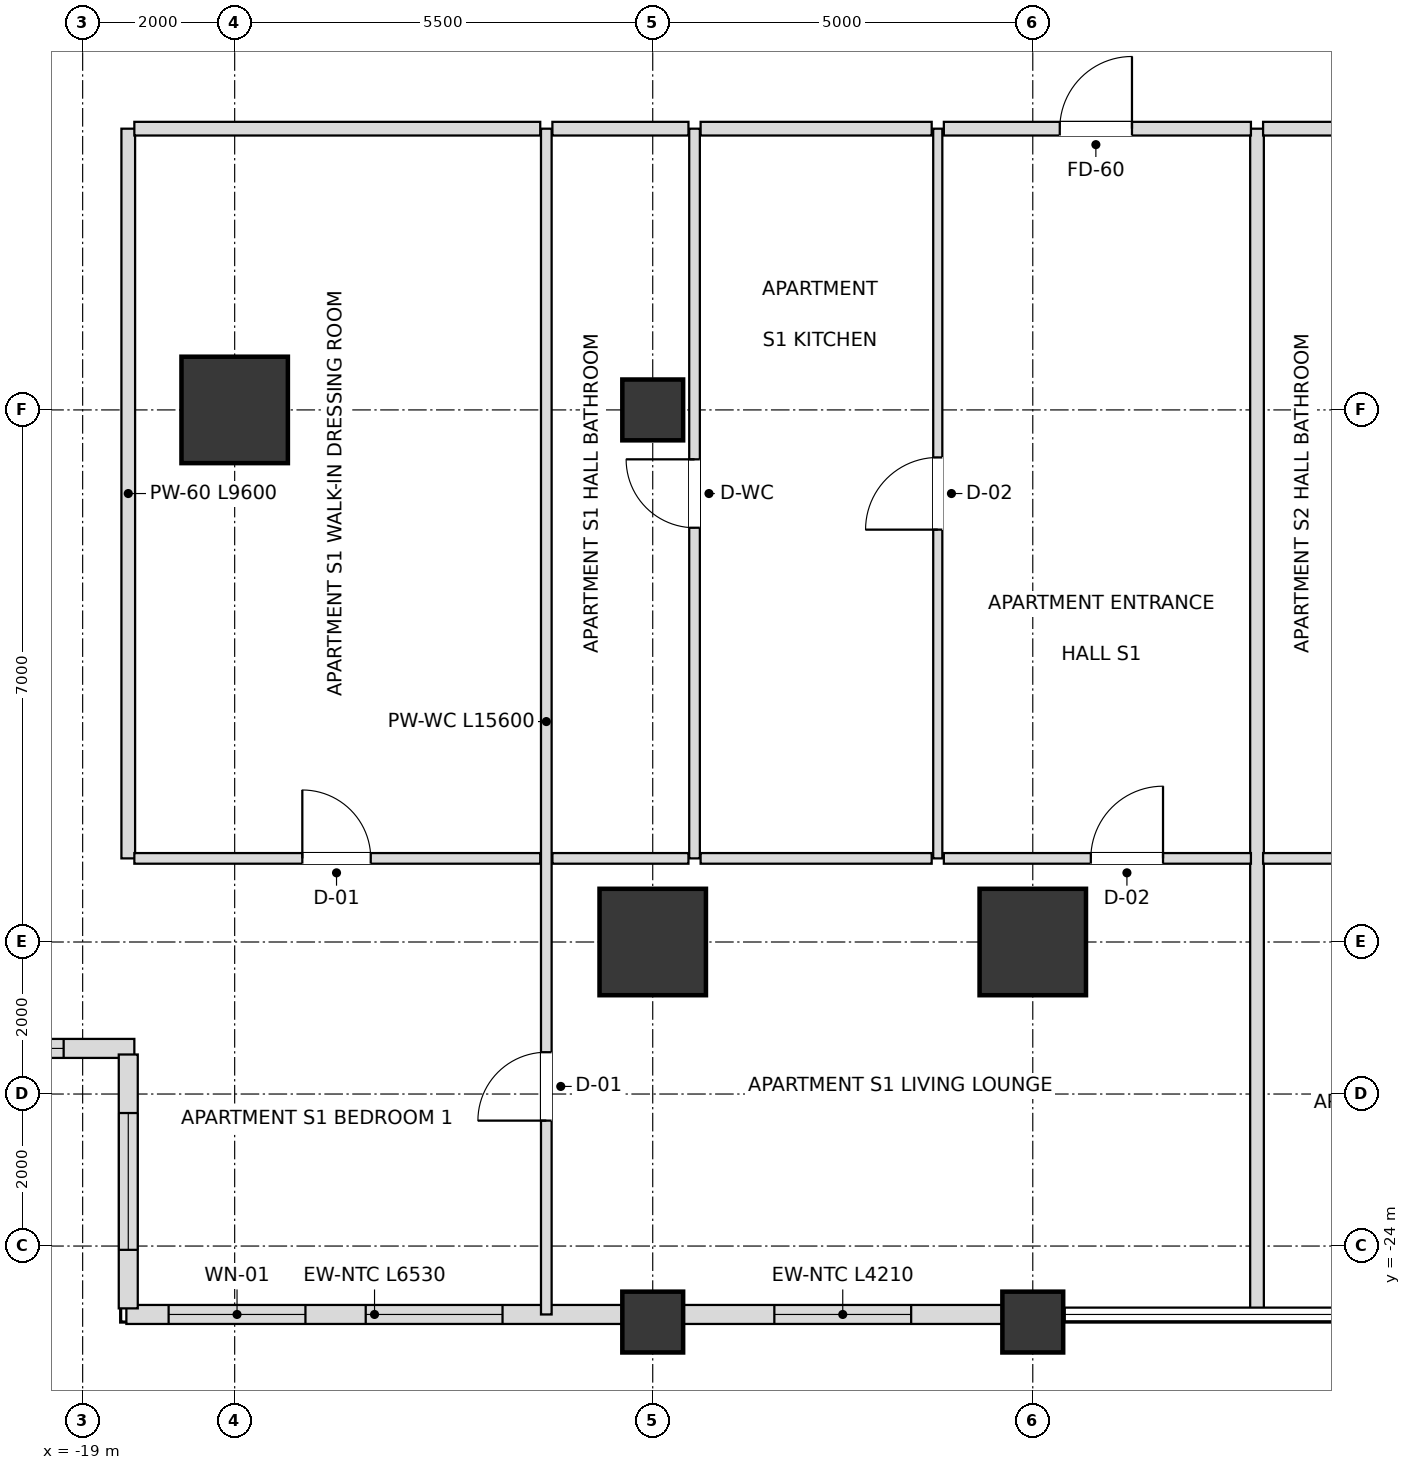
"""IFC4 building model, lengths in metres.
Left out: names, types, materials, properties, quantities, classifications, styles, units other than length and angle.
Written with IfcOpenShell. Run it as: python <this file> out.ifc"""

import sys

from ifc_helpers import new_model, si_unit, direction, frame, frame_2d, origin, origin_2d, place, context, subcontext, project, spatial, rectangle, extrude, element, fill, save


model = new_model("IFC4")
c1 = context("Model", 3, precision=1e-05, world=origin(), true_north=direction((0.0, 1.0)))
c2 = subcontext(c1, "Body", "Model", "MODEL_VIEW")
j1 = project(units=[si_unit("LENGTHUNIT", "METRE"), si_unit("PLANEANGLEUNIT", "RADIAN")], contexts=[c1])
p1 = place(None, origin())
s1 = spatial("IfcSite", under=j1, at=p1, CompositionType="ELEMENT")
p2 = place(p1, origin())
s2 = spatial("IfcBuilding", under=s1, at=p2, CompositionType="ELEMENT")
p3 = place(p2, frame((0.0, 0.0, 46.8)))
s3 = spatial("IfcBuildingStorey", under=s2, at=p3, CompositionType="ELEMENT", Elevation=46.8)
for number, where, z_axis, x_axis in (
    (1, (-11.5, -20.0, 0.0), (0.0, 0.0, 1.0), (1.0, 0.0, 0.0)),
    (2, (-6.5, -20.0, 0.0), (0.0, 0.0, 1.0), (1.0, 0.0, 0.0)),
    (3, (-17.0, -13.0, 0.0), (0.0, 0.0, 1.0), (1.0, 0.0, 0.0)),
):
    element("IfcColumn", number, at=place(p3, frame(where, z_axis=z_axis, x_axis=x_axis)), inside=s3, PredefinedType="USERDEFINED", context=c2, shape_type="SweptSolid", body=[
        extrude(rectangle(XDim=1.4, YDim=1.4, at=origin_2d()), origin(), (0.0, 0.0, 1.0), 3.6),
    ])
for number, where, z_axis, x_axis in (
    (4, (-11.5, -13.0, 0.0), (0.0, 0.0, 1.0), (1.0, 0.0, 0.0)),
    (5, (-11.5, -25.0, 0.0), (0.0, 0.0, 1.0), (1.0, 0.0, 0.0)),
    (6, (-6.5, -25.0, 0.0), (0.0, 0.0, 1.0), (1.0, 0.0, 0.0)),
):
    element("IfcColumn", number, at=place(p3, frame(where, z_axis=z_axis, x_axis=x_axis)), inside=s3, PredefinedType="COLUMN", context=c2, shape_type="SweptSolid", body=[
        extrude(rectangle(XDim=0.8, YDim=0.8, at=origin_2d()), origin(), (0.0, 0.0, 1.0), 3.6),
    ])
p4 = place(p3, frame((-18.425, -24.9, 0.0), z_axis=(0.0, 0.0, 1.0), x_axis=(1.0, 0.0, 0.0)))
e7 = element("IfcWall", 7, at=p4, inside=s3, PredefinedType="SOLIDWALL", context=c2, shape_type="SweptSolid", body=[
    extrude(rectangle(XDim=6.53, YDim=0.25, at=frame_2d((3.265, 0.0))), origin(), (0.0, 0.0, 1.0), 2.736),
])
p5 = place(p4, frame((0.556, 0.0, 0.72)))
e8 = element("IfcOpeningElement", 8, at=p5, cuts=e7, PredefinedType="OPENING", context=c2, shape_type="SweptSolid", body=[
    extrude(rectangle(XDim=1.8, YDim=1.68, at=frame_2d((0.9, 0.84))), frame((0.0, 0.135, 0.0), z_axis=(0.0, -1.0, 0.0), x_axis=(1.0, 0.0, 0.0)), (0.0, 0.0, 1.0), 0.27),
])
p6 = place(p4, frame((3.149, 0.0, 0.72)))
e9 = element("IfcOpeningElement", 9, at=p6, cuts=e7, PredefinedType="OPENING", context=c2, shape_type="SweptSolid", body=[
    extrude(rectangle(XDim=1.8, YDim=1.68, at=frame_2d((0.9, 0.84))), frame((0.0, 0.135, 0.0), z_axis=(0.0, -1.0, 0.0), x_axis=(1.0, 0.0, 0.0)), (0.0, 0.0, 1.0), 0.27),
])
p7 = place(p3, frame((-11.105, -24.9, 0.0), z_axis=(0.0, 0.0, 1.0), x_axis=(1.0, 0.0, 0.0)))
e10 = element("IfcWall", 10, at=p7, inside=s3, PredefinedType="SOLIDWALL", context=c2, shape_type="SweptSolid", body=[
    extrude(rectangle(XDim=4.21, YDim=0.25, at=frame_2d((2.105, 0.0))), origin(), (0.0, 0.0, 1.0), 2.736),
])
p8 = place(p7, frame((1.205, 0.0, 0.72)))
e11 = element("IfcOpeningElement", 11, at=p8, cuts=e10, PredefinedType="OPENING", context=c2, shape_type="SweptSolid", body=[
    extrude(rectangle(XDim=1.8, YDim=1.68, at=frame_2d((0.9, 0.84))), frame((0.0, 0.135, 0.0), z_axis=(0.0, -1.0, 0.0), x_axis=(1.0, 0.0, 0.0)), (0.0, 0.0, 1.0), 0.27),
])
p9 = place(p3, frame((-21.98, -21.4, 0.0), z_axis=(0.0, 0.0, 1.0), x_axis=(1.0, 0.0, 0.0)))
e12 = element("IfcWall", 12, at=p9, inside=s3, PredefinedType="SOLIDWALL", context=c2, shape_type="SweptSolid", body=[
    extrude(rectangle(XDim=3.66, YDim=0.25, at=frame_2d((1.83, 0.0))), origin(), (0.0, 0.0, 1.0), 2.736),
])
p10 = place(p9, frame((0.93, 0.0, 0.72)))
e13 = element("IfcOpeningElement", 13, at=p10, cuts=e12, PredefinedType="OPENING", context=c2, shape_type="SweptSolid", body=[
    extrude(rectangle(XDim=1.8, YDim=1.68, at=frame_2d((0.9, 0.84))), frame((0.0, 0.135, 0.0), z_axis=(0.0, -1.0, 0.0), x_axis=(1.0, 0.0, 0.0)), (0.0, 0.0, 1.0), 0.27),
])
p11 = place(p3, frame((-18.4, -21.48, 0.0), z_axis=(0.0, 0.0, 1.0), x_axis=(0.0, -1.0, 0.0)))
e14 = element("IfcWall", 14, at=p11, inside=s3, PredefinedType="SOLIDWALL", context=c2, shape_type="SweptSolid", body=[
    extrude(rectangle(XDim=3.34, YDim=0.25, at=frame_2d((1.67, 0.0))), origin(), (0.0, 0.0, 1.0), 2.736),
])
p12 = place(p11, frame((0.77, 0.0, 0.72)))
e15 = element("IfcOpeningElement", 15, at=p12, cuts=e14, PredefinedType="OPENING", context=c2, shape_type="SweptSolid", body=[
    extrude(rectangle(XDim=1.8, YDim=1.68, at=frame_2d((0.9, 0.84))), frame((0.0, 0.135, 0.0), z_axis=(0.0, -1.0, 0.0), x_axis=(1.0, 0.0, 0.0)), (0.0, 0.0, 1.0), 0.27),
])
p13 = place(p3, frame((-18.4, -18.9, 0.0), z_axis=(0.0, 0.0, 1.0), x_axis=(0.0, 1.0, 0.0)))
e16 = element("IfcWall", 16, at=p13, inside=s3, PredefinedType="PARTITIONING", context=c2, shape_type="SweptSolid", body=[
    extrude(rectangle(XDim=9.6, YDim=0.18, at=frame_2d((4.8, 0.0))), origin(), (0.0, 0.0, 1.0), 2.736),
])
p14 = place(p3, frame((-12.9, -24.9, 0.0), z_axis=(0.0, 0.0, 1.0), x_axis=(0.0, 1.0, 0.0)))
e17 = element("IfcWall", 17, at=p14, inside=s3, PredefinedType="PARTITIONING", context=c2, shape_type="SweptSolid", body=[
    extrude(rectangle(XDim=15.6, YDim=0.14, at=frame_2d((7.8, 0.0))), origin(), (0.0, 0.0, 1.0), 2.736),
])
p15 = place(p14, frame((2.55, 0.0, 0.0)))
e18 = element("IfcOpeningElement", 18, at=p15, cuts=e17, PredefinedType="OPENING", context=c2, shape_type="SweptSolid", body=[
    extrude(rectangle(XDim=0.9, YDim=2.1, at=frame_2d((0.45, 1.05))), frame((0.0, 0.08, 0.0), z_axis=(0.0, -1.0, 0.0), x_axis=(1.0, 0.0, 0.0)), (0.0, 0.0, 1.0), 0.16),
])
p16 = place(p3, frame((-10.95, -18.9, 0.0), z_axis=(0.0, 0.0, 1.0), x_axis=(0.0, 1.0, 0.0)))
e19 = element("IfcWall", 19, at=p16, inside=s3, PredefinedType="PARTITIONING", context=c2, shape_type="SweptSolid", body=[
    extrude(rectangle(XDim=9.6, YDim=0.14, at=frame_2d((4.8, 0.0))), origin(), (0.0, 0.0, 1.0), 2.816),
])
p17 = place(p16, frame((4.35, 0.0, 0.0)))
e20 = element("IfcOpeningElement", 20, at=p17, cuts=e19, PredefinedType="OPENING", context=c2, shape_type="SweptSolid", body=[
    extrude(rectangle(XDim=0.9, YDim=2.1, at=frame_2d((0.45, 1.05))), frame((0.0, 0.08, 0.0), z_axis=(0.0, -1.0, 0.0), x_axis=(1.0, 0.0, 0.0)), (0.0, 0.0, 1.0), 0.16),
])
p18 = place(p3, frame((-7.75, -18.9, 0.0), z_axis=(0.0, 0.0, 1.0), x_axis=(0.0, 1.0, 0.0)))
e21 = element("IfcWall", 21, at=p18, inside=s3, PredefinedType="PARTITIONING", context=c2, shape_type="SweptSolid", body=[
    extrude(rectangle(XDim=9.6, YDim=0.12, at=frame_2d((4.8, 0.0))), origin(), (0.0, 0.0, 1.0), 2.816),
])
p19 = place(p18, frame((4.325, 0.0, 0.0)))
e22 = element("IfcOpeningElement", 22, at=p19, cuts=e21, PredefinedType="OPENING", context=c2, shape_type="SweptSolid", body=[
    extrude(rectangle(XDim=0.95, YDim=2.1, at=frame_2d((0.475, 1.05))), frame((0.0, 0.07, 0.0), z_axis=(0.0, -1.0, 0.0), x_axis=(1.0, 0.0, 0.0)), (0.0, 0.0, 1.0), 0.14),
])
p20 = place(p3, frame((-3.55, -24.9, 0.0), z_axis=(0.0, 0.0, 1.0), x_axis=(0.0, 1.0, 0.0)))
e23 = element("IfcWall", 23, at=p20, inside=s3, PredefinedType="PARTITIONING", context=c2, shape_type="SweptSolid", body=[
    extrude(rectangle(XDim=15.6, YDim=0.18, at=frame_2d((7.8, 0.0))), origin(), (0.0, 0.0, 1.0), 2.816),
])
p21 = place(p3, frame((-18.32, -18.9, 0.0), z_axis=(0.0, 0.0, 1.0), x_axis=(1.0, 0.0, 0.0)))
e24 = element("IfcWall", 24, at=p21, inside=s3, PredefinedType="PARTITIONING", context=c2, shape_type="SweptSolid", body=[
    extrude(rectangle(XDim=5.34, YDim=0.14, at=frame_2d((2.67, 0.0))), origin(), (0.0, 0.0, 1.0), 2.736),
])
p22 = place(p21, frame((2.21, 0.0, 0.0)))
e25 = element("IfcOpeningElement", 25, at=p22, cuts=e24, PredefinedType="OPENING", context=c2, shape_type="SweptSolid", body=[
    extrude(rectangle(XDim=0.9, YDim=2.1, at=frame_2d((0.45, 1.05))), frame((0.0, 0.08, 0.0), z_axis=(0.0, -1.0, 0.0), x_axis=(1.0, 0.0, 0.0)), (0.0, 0.0, 1.0), 0.16),
])
p23 = place(p3, frame((-12.82, -18.9, 0.0), z_axis=(0.0, 0.0, 1.0), x_axis=(1.0, 0.0, 0.0)))
e26 = element("IfcWall", 26, at=p23, inside=s3, PredefinedType="PARTITIONING", context=c2, shape_type="SweptSolid", body=[
    extrude(rectangle(XDim=1.79, YDim=0.14, at=frame_2d((0.895, 0.0))), origin(), (0.0, 0.0, 1.0), 2.736),
])
p24 = place(p3, frame((-10.87, -18.9, 0.0), z_axis=(0.0, 0.0, 1.0), x_axis=(1.0, 0.0, 0.0)))
e27 = element("IfcWall", 27, at=p24, inside=s3, PredefinedType="PARTITIONING", context=c2, shape_type="SweptSolid", body=[
    extrude(rectangle(XDim=3.04, YDim=0.14, at=frame_2d((1.52, 0.0))), origin(), (0.0, 0.0, 1.0), 3.38),
])
p25 = place(p3, frame((-7.67, -18.9, 0.0), z_axis=(0.0, 0.0, 1.0), x_axis=(1.0, 0.0, 0.0)))
e28 = element("IfcWall", 28, at=p25, inside=s3, PredefinedType="PARTITIONING", context=c2, shape_type="SweptSolid", body=[
    extrude(rectangle(XDim=4.04, YDim=0.14, at=frame_2d((2.02, 0.0))), origin(), (0.0, 0.0, 1.0), 2.816),
])
p26 = place(p25, frame((1.934, 0.0, 0.0)))
e29 = element("IfcOpeningElement", 29, at=p26, cuts=e28, PredefinedType="OPENING", context=c2, shape_type="SweptSolid", body=[
    extrude(rectangle(XDim=0.95, YDim=2.1, at=frame_2d((0.475, 1.05))), frame((0.0, 0.08, 0.0), z_axis=(0.0, -1.0, 0.0), x_axis=(1.0, 0.0, 0.0)), (0.0, 0.0, 1.0), 0.16),
])
p27 = place(p3, frame((-3.47, -18.9, 0.0), z_axis=(0.0, 0.0, 1.0), x_axis=(1.0, 0.0, 0.0)))
e30 = element("IfcWall", 30, at=p27, inside=s3, PredefinedType="PARTITIONING", context=c2, shape_type="SweptSolid", body=[
    extrude(rectangle(XDim=1.79, YDim=0.14, at=frame_2d((0.895, 0.0))), origin(), (0.0, 0.0, 1.0), 3.38),
])
p28 = place(p3, frame((-18.32, -9.3, 0.0), z_axis=(0.0, 0.0, 1.0), x_axis=(1.0, 0.0, 0.0)))
e31 = element("IfcWall", 31, at=p28, inside=s3, PredefinedType="PARTITIONING", context=c2, shape_type="SweptSolid", body=[
    extrude(rectangle(XDim=5.34, YDim=0.18, at=frame_2d((2.67, 0.0))), origin(), (0.0, 0.0, 1.0), 2.816),
])
p29 = place(p3, frame((-12.82, -9.3, 0.0), z_axis=(0.0, 0.0, 1.0), x_axis=(1.0, 0.0, 0.0)))
e32 = element("IfcWall", 32, at=p29, inside=s3, PredefinedType="PARTITIONING", context=c2, shape_type="SweptSolid", body=[
    extrude(rectangle(XDim=1.79, YDim=0.18, at=frame_2d((0.895, 0.0))), origin(), (0.0, 0.0, 1.0), 3.38),
])
p30 = place(p3, frame((-10.87, -9.3, 0.0), z_axis=(0.0, 0.0, 1.0), x_axis=(1.0, 0.0, 0.0)))
e33 = element("IfcWall", 33, at=p30, inside=s3, PredefinedType="PARTITIONING", context=c2, shape_type="SweptSolid", body=[
    extrude(rectangle(XDim=3.04, YDim=0.18, at=frame_2d((1.52, 0.0))), origin(), (0.0, 0.0, 1.0), 3.38),
])
p31 = place(p3, frame((-7.67, -9.3, 0.0), z_axis=(0.0, 0.0, 1.0), x_axis=(1.0, 0.0, 0.0)))
e34 = element("IfcWall", 34, at=p31, inside=s3, PredefinedType="PARTITIONING", context=c2, shape_type="SweptSolid", body=[
    extrude(rectangle(XDim=4.04, YDim=0.18, at=frame_2d((2.02, 0.0))), origin(), (0.0, 0.0, 1.0), 2.816),
])
p32 = place(p31, frame((1.525, 0.0, 0.0)))
e35 = element("IfcOpeningElement", 35, at=p32, cuts=e34, PredefinedType="OPENING", context=c2, shape_type="SweptSolid", body=[
    extrude(rectangle(XDim=0.95, YDim=2.15, at=frame_2d((0.475, 1.075))), frame((0.0, 0.1, 0.0), z_axis=(0.0, -1.0, 0.0), x_axis=(1.0, 0.0, 0.0)), (0.0, 0.0, 1.0), 0.2),
])
p33 = place(p3, frame((-3.47, -9.3, 0.0), z_axis=(0.0, 0.0, 1.0), x_axis=(1.0, 0.0, 0.0)))
e36 = element("IfcWall", 36, at=p33, inside=s3, PredefinedType="PARTITIONING", context=c2, shape_type="SweptSolid", body=[
    extrude(rectangle(XDim=1.79, YDim=0.18, at=frame_2d((0.895, 0.0))), origin(), (0.0, 0.0, 1.0), 3.38),
])
p34 = place(p5, origin())
e37 = element("IfcWindow", 37, at=p34, inside=s3, PartitioningType="SINGLE_PANEL", PredefinedType="WINDOW", context=c2, shape_type="SweptSolid", body=[
    extrude(rectangle(XDim=1.8, YDim=1.68, at=frame_2d((0.9, 0.84))), frame((0.0, 0.03, 0.0), z_axis=(0.0, -1.0, 0.0), x_axis=(1.0, 0.0, 0.0)), (0.0, 0.0, 1.0), 0.06),
])
fill(e8, e37)
p35 = place(p6, origin())
e38 = element("IfcWindow", 38, at=p35, inside=s3, PartitioningType="SINGLE_PANEL", PredefinedType="WINDOW", context=c2, shape_type="SweptSolid", body=[
    extrude(rectangle(XDim=1.8, YDim=1.68, at=frame_2d((0.9, 0.84))), frame((0.0, 0.03, 0.0), z_axis=(0.0, -1.0, 0.0), x_axis=(1.0, 0.0, 0.0)), (0.0, 0.0, 1.0), 0.06),
])
fill(e9, e38)
p36 = place(p8, origin())
e39 = element("IfcWindow", 39, at=p36, inside=s3, PartitioningType="SINGLE_PANEL", PredefinedType="WINDOW", context=c2, shape_type="SweptSolid", body=[
    extrude(rectangle(XDim=1.8, YDim=1.68, at=frame_2d((0.9, 0.84))), frame((0.0, 0.03, 0.0), z_axis=(0.0, -1.0, 0.0), x_axis=(1.0, 0.0, 0.0)), (0.0, 0.0, 1.0), 0.06),
])
fill(e11, e39)
p37 = place(p10, origin())
e40 = element("IfcWindow", 40, at=p37, inside=s3, PartitioningType="SINGLE_PANEL", PredefinedType="WINDOW", context=c2, shape_type="SweptSolid", body=[
    extrude(rectangle(XDim=1.8, YDim=1.68, at=frame_2d((0.9, 0.84))), frame((0.0, 0.03, 0.0), z_axis=(0.0, -1.0, 0.0), x_axis=(1.0, 0.0, 0.0)), (0.0, 0.0, 1.0), 0.06),
])
fill(e13, e40)
p38 = place(p12, origin())
e41 = element("IfcWindow", 41, at=p38, inside=s3, PartitioningType="SINGLE_PANEL", PredefinedType="WINDOW", context=c2, shape_type="SweptSolid", body=[
    extrude(rectangle(XDim=1.8, YDim=1.68, at=frame_2d((0.9, 0.84))), frame((0.0, 0.03, 0.0), z_axis=(0.0, -1.0, 0.0), x_axis=(1.0, 0.0, 0.0)), (0.0, 0.0, 1.0), 0.06),
])
fill(e15, e41)
p39 = place(p32, origin())
e42 = element("IfcDoor", 42, at=p39, inside=s3, OperationType="SINGLE_SWING_RIGHT", PredefinedType="DOOR", context=c2, shape_type="SweptSolid", body=[
    extrude(rectangle(XDim=0.95, YDim=2.15, at=frame_2d((0.475, 1.075))), frame((0.0, 0.025, 0.0), z_axis=(0.0, -1.0, 0.0), x_axis=(1.0, 0.0, 0.0)), (0.0, 0.0, 1.0), 0.05),
])
fill(e35, e42)
p40 = place(p19, origin())
e43 = element("IfcDoor", 43, at=p40, inside=s3, OperationType="SINGLE_SWING_LEFT", PredefinedType="DOOR", context=c2, shape_type="SweptSolid", body=[
    extrude(rectangle(XDim=0.95, YDim=2.1, at=frame_2d((0.475, 1.05))), frame((0.0, 0.025, 0.0), z_axis=(0.0, -1.0, 0.0), x_axis=(1.0, 0.0, 0.0)), (0.0, 0.0, 1.0), 0.05),
])
fill(e22, e43)
p41 = place(p17, origin())
e44 = element("IfcDoor", 44, at=p41, inside=s3, OperationType="SINGLE_SWING_RIGHT", PredefinedType="DOOR", context=c2, shape_type="SweptSolid", body=[
    extrude(rectangle(XDim=0.9, YDim=2.1, at=frame_2d((0.45, 1.05))), frame((0.0, 0.025, 0.0), z_axis=(0.0, -1.0, 0.0), x_axis=(1.0, 0.0, 0.0)), (0.0, 0.0, 1.0), 0.05),
])
fill(e20, e44)
p42 = place(p22, origin())
e45 = element("IfcDoor", 45, at=p42, inside=s3, OperationType="SINGLE_SWING_LEFT", PredefinedType="DOOR", context=c2, shape_type="SweptSolid", body=[
    extrude(rectangle(XDim=0.9, YDim=2.1, at=frame_2d((0.45, 1.05))), frame((0.0, 0.025, 0.0), z_axis=(0.0, -1.0, 0.0), x_axis=(1.0, 0.0, 0.0)), (0.0, 0.0, 1.0), 0.05),
])
fill(e25, e45)
p43 = place(p26, origin())
e46 = element("IfcDoor", 46, at=p43, inside=s3, OperationType="SINGLE_SWING_RIGHT", PredefinedType="DOOR", context=c2, shape_type="SweptSolid", body=[
    extrude(rectangle(XDim=0.95, YDim=2.1, at=frame_2d((0.475, 1.05))), frame((0.0, 0.025, 0.0), z_axis=(0.0, -1.0, 0.0), x_axis=(1.0, 0.0, 0.0)), (0.0, 0.0, 1.0), 0.05),
])
fill(e29, e46)
p44 = place(p15, origin())
e47 = element("IfcDoor", 47, at=p44, inside=s3, OperationType="SINGLE_SWING_LEFT", PredefinedType="DOOR", context=c2, shape_type="SweptSolid", body=[
    extrude(rectangle(XDim=0.9, YDim=2.1, at=frame_2d((0.45, 1.05))), frame((0.0, 0.025, 0.0), z_axis=(0.0, -1.0, 0.0), x_axis=(1.0, 0.0, 0.0)), (0.0, 0.0, 1.0), 0.05),
])
fill(e18, e47)
save(model, sys.argv[1])
